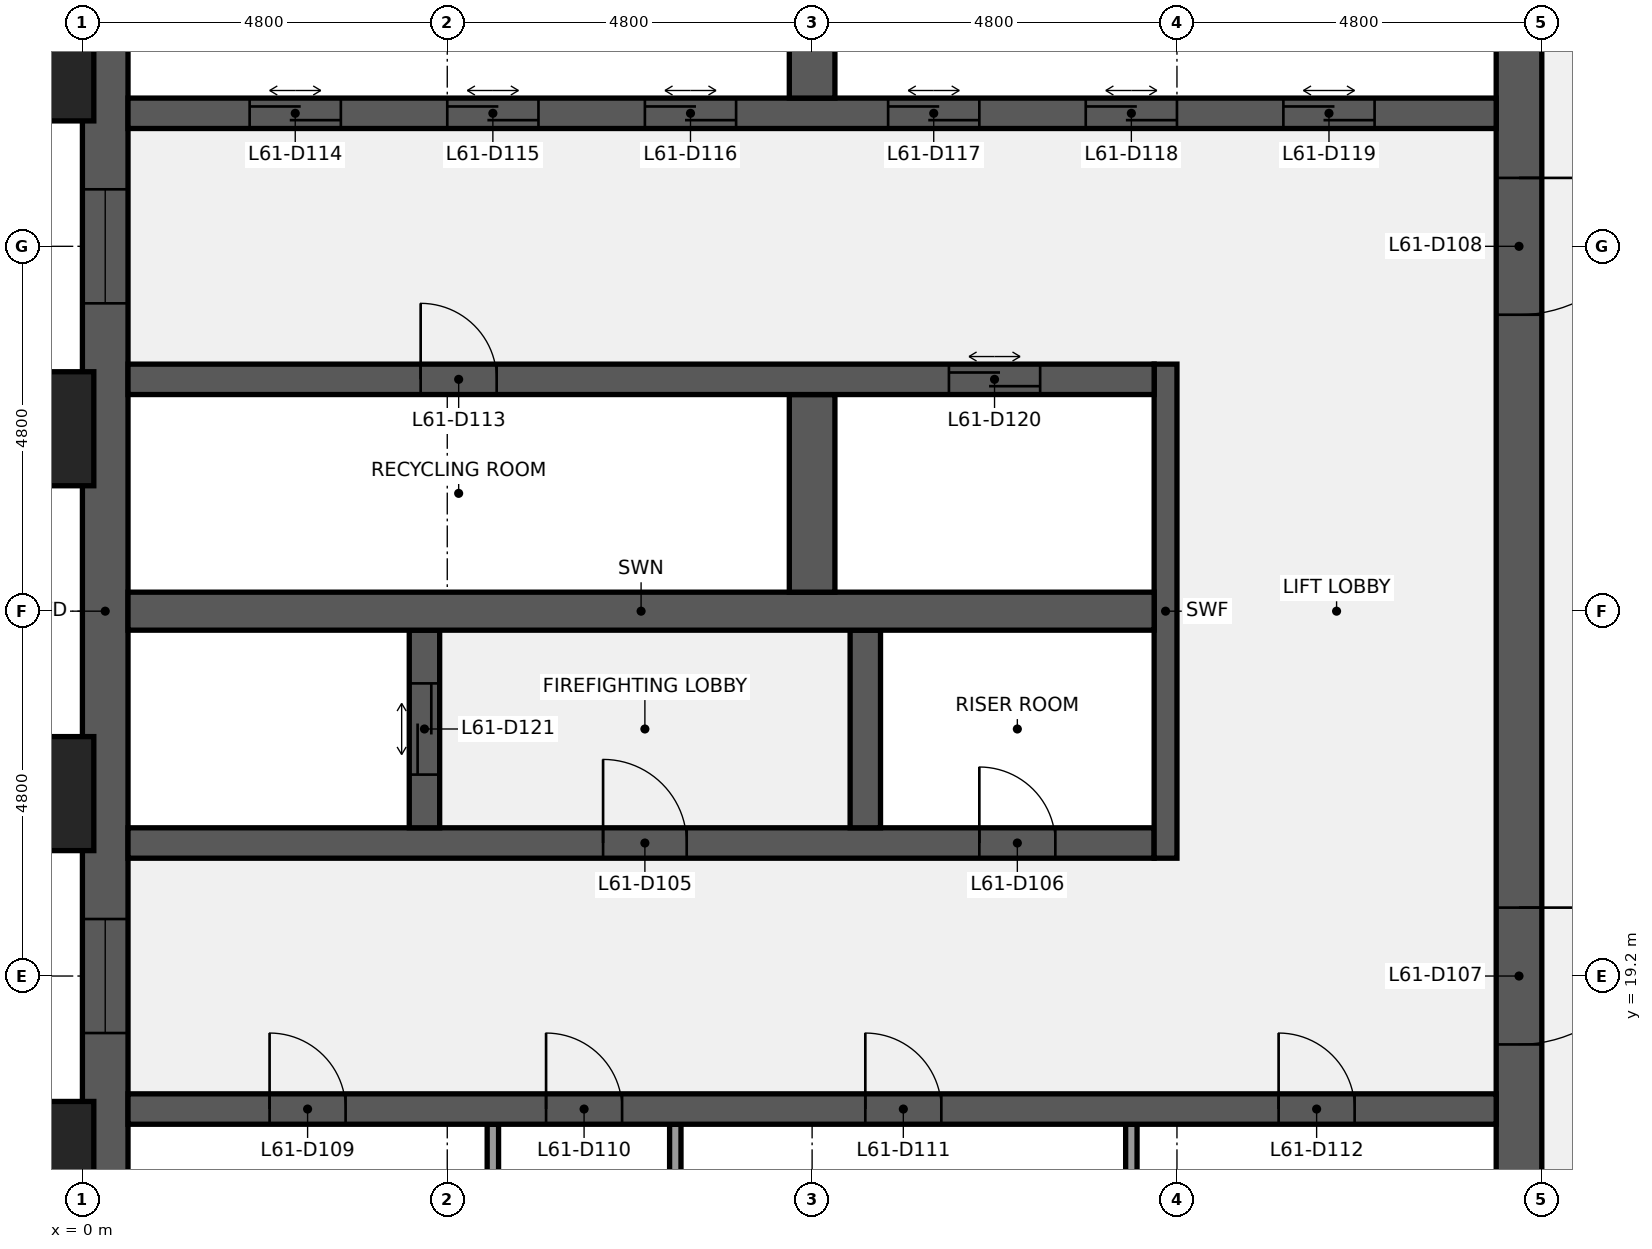
"""IFC4 building model, lengths in metres.
Left out: names, types, materials, properties, quantities, classifications, styles, units other than length and angle.
Written with IfcOpenShell. Run it as: python <this file> out.ifc"""

import sys

from ifc_helpers import new_model, si_unit, direction, frame, frame_2d, origin, origin_2d, place, context, subcontext, project, spatial, rectangle, extrude, element, fill, save


model = new_model("IFC4")
c1 = context("Model", 3, precision=1e-05, world=origin(), true_north=direction((0.0, 1.0)))
c2 = subcontext(c1, "Body", "Model", "MODEL_VIEW")
j1 = project(units=[si_unit("LENGTHUNIT", "METRE"), si_unit("PLANEANGLEUNIT", "RADIAN")], contexts=[c1])
p1 = place(None, origin())
s1 = spatial("IfcSite", under=j1, at=p1, CompositionType="ELEMENT")
p2 = place(p1, origin())
s2 = spatial("IfcBuilding", under=s1, at=p2, CompositionType="ELEMENT")
p3 = place(p2, frame((0.0, 0.0, 282.3)))
s3 = spatial("IfcBuildingStorey", under=s2, at=p3, CompositionType="ELEMENT", Elevation=282.3)
p4 = place(p3, frame((0.3, 9.6, 0.0), z_axis=(0.0, 0.0, 1.0), x_axis=(0.0, 1.0, 0.0)))
e1 = element("IfcWall", 1, at=p4, inside=s3, PredefinedType="SHEAR", context=c2, shape_type="SweptSolid", body=[
    extrude(rectangle(XDim=28.8, YDim=0.6, at=frame_2d((14.4, 0.0))), origin(), (0.0, 0.0, 1.0), 3.84),
])
p5 = place(p4, frame((8.85, 0.0, 0.9)))
e2 = element("IfcOpeningElement", 2, at=p5, cuts=e1, PredefinedType="OPENING", context=c2, shape_type="SweptSolid", body=[
    extrude(rectangle(XDim=1.5, YDim=1.5, at=frame_2d((0.75, 0.75))), frame((0.0, 0.31, 0.0), z_axis=(0.0, -1.0, 0.0), x_axis=(1.0, 0.0, 0.0)), (0.0, 0.0, 1.0), 0.62),
])
p6 = place(p4, frame((18.45, 0.0, 0.9)))
e3 = element("IfcOpeningElement", 3, at=p6, cuts=e1, PredefinedType="OPENING", context=c2, shape_type="SweptSolid", body=[
    extrude(rectangle(XDim=1.5, YDim=1.5, at=frame_2d((0.75, 0.75))), frame((0.0, 0.31, 0.0), z_axis=(0.0, -1.0, 0.0), x_axis=(1.0, 0.0, 0.0)), (0.0, 0.0, 1.0), 0.62),
])
p7 = place(p3, frame((18.9, 38.4, 0.0), z_axis=(0.0, 0.0, 1.0), x_axis=(0.0, -1.0, 0.0)))
e4 = element("IfcWall", 4, at=p7, inside=s3, PredefinedType="SHEAR", context=c2, shape_type="SweptSolid", body=[
    extrude(rectangle(XDim=28.8, YDim=0.6, at=frame_2d((14.4, 0.0))), origin(), (0.0, 0.0, 1.0), 3.84),
])
p8 = place(p7, frame((18.3, 0.0, 0.0)))
e5 = element("IfcOpeningElement", 5, at=p8, cuts=e4, PredefinedType="OPENING", context=c2, shape_type="SweptSolid", body=[
    extrude(rectangle(XDim=1.8, YDim=2.1, at=frame_2d((0.9, 1.05))), frame((0.0, 0.31, 0.0), z_axis=(0.0, -1.0, 0.0), x_axis=(1.0, 0.0, 0.0)), (0.0, 0.0, 1.0), 0.62),
])
p9 = place(p7, frame((8.7, 0.0, 0.0)))
e6 = element("IfcOpeningElement", 6, at=p9, cuts=e4, PredefinedType="OPENING", context=c2, shape_type="SweptSolid", body=[
    extrude(rectangle(XDim=1.8, YDim=2.1, at=frame_2d((0.9, 1.05))), frame((0.0, 0.31, 0.0), z_axis=(0.0, -1.0, 0.0), x_axis=(1.0, 0.0, 0.0)), (0.0, 0.0, 1.0), 0.62),
])
for number, where, z_axis, x_axis in (
    (7, (5.4, 14.65, 0.0), (0.0, 0.0, 1.0), (0.0, 1.0, 0.0)),
    (8, (7.8, 14.65, 0.0), (0.0, 0.0, 1.0), (0.0, 1.0, 0.0)),
    (9, (13.8, 14.65, 0.0), (0.0, 0.0, 1.0), (0.0, 1.0, 0.0)),
):
    element("IfcWall", number, at=place(p3, frame(where, z_axis=z_axis, x_axis=x_axis)), inside=s3, PredefinedType="PARTITIONING", context=c2, shape_type="SweptSolid", body=[
        extrude(rectangle(XDim=2.6, YDim=0.15, at=frame_2d((1.3, 0.0))), origin(), (0.0, 0.0, 1.0), 3.84),
    ])
p10 = place(p3, frame((0.6, 17.45, 0.0), z_axis=(0.0, 0.0, 1.0), x_axis=(1.0, 0.0, 0.0)))
e10 = element("IfcWall", 10, at=p10, inside=s3, PredefinedType="SHEAR", context=c2, shape_type="SweptSolid", body=[
    extrude(rectangle(XDim=18.0, YDim=0.4, at=frame_2d((9.0, 0.0))), origin(), (0.0, 0.0, 1.0), 3.84),
])
p11 = place(p10, frame((1.863, 0.0, 0.0)))
e11 = element("IfcOpeningElement", 11, at=p11, cuts=e10, PredefinedType="OPENING", context=c2, shape_type="SweptSolid", body=[
    extrude(rectangle(XDim=1.0, YDim=2.1, at=frame_2d((0.5, 1.05))), frame((0.0, 0.21, 0.0), z_axis=(0.0, -1.0, 0.0), x_axis=(1.0, 0.0, 0.0)), (0.0, 0.0, 1.0), 0.42),
])
p12 = place(p10, frame((5.5, 0.0, 0.0)))
e12 = element("IfcOpeningElement", 12, at=p12, cuts=e10, PredefinedType="OPENING", context=c2, shape_type="SweptSolid", body=[
    extrude(rectangle(XDim=1.0, YDim=2.1, at=frame_2d((0.5, 1.05))), frame((0.0, 0.21, 0.0), z_axis=(0.0, -1.0, 0.0), x_axis=(1.0, 0.0, 0.0)), (0.0, 0.0, 1.0), 0.42),
])
p13 = place(p10, frame((9.7, 0.0, 0.0)))
e13 = element("IfcOpeningElement", 13, at=p13, cuts=e10, PredefinedType="OPENING", context=c2, shape_type="SweptSolid", body=[
    extrude(rectangle(XDim=1.0, YDim=2.1, at=frame_2d((0.5, 1.05))), frame((0.0, 0.21, 0.0), z_axis=(0.0, -1.0, 0.0), x_axis=(1.0, 0.0, 0.0)), (0.0, 0.0, 1.0), 0.42),
])
p14 = place(p10, frame((15.137, 0.0, 0.0)))
e14 = element("IfcOpeningElement", 14, at=p14, cuts=e10, PredefinedType="OPENING", context=c2, shape_type="SweptSolid", body=[
    extrude(rectangle(XDim=1.0, YDim=2.1, at=frame_2d((0.5, 1.05))), frame((0.0, 0.21, 0.0), z_axis=(0.0, -1.0, 0.0), x_axis=(1.0, 0.0, 0.0)), (0.0, 0.0, 1.0), 0.42),
])
p15 = place(p3, frame((0.6, 20.95, 0.0), z_axis=(0.0, 0.0, 1.0), x_axis=(1.0, 0.0, 0.0)))
e15 = element("IfcWall", 15, at=p15, inside=s3, PredefinedType="SHEAR", context=c2, shape_type="SweptSolid", body=[
    extrude(rectangle(XDim=13.5, YDim=0.4, at=frame_2d((6.75, 0.0))), origin(), (0.0, 0.0, 1.0), 3.84),
])
p16 = place(p15, frame((6.25, 0.0, 0.0)))
e16 = element("IfcOpeningElement", 16, at=p16, cuts=e15, PredefinedType="OPENING", context=c2, shape_type="SweptSolid", body=[
    extrude(rectangle(XDim=1.1, YDim=2.1, at=frame_2d((0.55, 1.05))), frame((0.0, 0.21, 0.0), z_axis=(0.0, -1.0, 0.0), x_axis=(1.0, 0.0, 0.0)), (0.0, 0.0, 1.0), 0.42),
])
p17 = place(p15, frame((11.2, 0.0, 0.0)))
e17 = element("IfcOpeningElement", 17, at=p17, cuts=e15, PredefinedType="OPENING", context=c2, shape_type="SweptSolid", body=[
    extrude(rectangle(XDim=1.0, YDim=2.1, at=frame_2d((0.5, 1.05))), frame((0.0, 0.21, 0.0), z_axis=(0.0, -1.0, 0.0), x_axis=(1.0, 0.0, 0.0)), (0.0, 0.0, 1.0), 0.42),
])
p18 = place(p3, frame((14.25, 20.75, 0.0), z_axis=(0.0, 0.0, 1.0), x_axis=(0.0, 1.0, 0.0)))
e18 = element("IfcWall", 18, at=p18, inside=s3, PredefinedType="SHEAR", context=c2, shape_type="SweptSolid", body=[
    extrude(rectangle(XDim=6.5, YDim=0.3, at=frame_2d((3.25, 0.0))), origin(), (0.0, 0.0, 1.0), 3.84),
])
p19 = place(p3, frame((4.5, 21.15, 0.0), z_axis=(0.0, 0.0, 1.0), x_axis=(0.0, 1.0, 0.0)))
e19 = element("IfcWall", 19, at=p19, inside=s3, PredefinedType="SHEAR", context=c2, shape_type="SweptSolid", body=[
    extrude(rectangle(XDim=2.6, YDim=0.4, at=frame_2d((1.3, 0.0))), origin(), (0.0, 0.0, 1.0), 3.84),
])
p20 = place(p19, frame((0.7, 0.0, 0.0)))
e20 = element("IfcOpeningElement", 20, at=p20, cuts=e19, PredefinedType="OPENING", context=c2, shape_type="SweptSolid", body=[
    extrude(rectangle(XDim=1.2, YDim=2.1, at=frame_2d((0.6, 1.05))), frame((0.0, 0.21, 0.0), z_axis=(0.0, -1.0, 0.0), x_axis=(1.0, 0.0, 0.0)), (0.0, 0.0, 1.0), 0.42),
])
p21 = place(p3, frame((10.3, 21.15, 0.0), z_axis=(0.0, 0.0, 1.0), x_axis=(0.0, 1.0, 0.0)))
e21 = element("IfcWall", 21, at=p21, inside=s3, PredefinedType="SHEAR", context=c2, shape_type="SweptSolid", body=[
    extrude(rectangle(XDim=2.6, YDim=0.4, at=frame_2d((1.3, 0.0))), origin(), (0.0, 0.0, 1.0), 3.84),
])
p22 = place(p3, frame((0.6, 24.0, 0.0), z_axis=(0.0, 0.0, 1.0), x_axis=(1.0, 0.0, 0.0)))
e22 = element("IfcWall", 22, at=p22, inside=s3, PredefinedType="SHEAR", context=c2, shape_type="SweptSolid", body=[
    extrude(rectangle(XDim=13.5, YDim=0.5, at=frame_2d((6.75, 0.0))), origin(), (0.0, 0.0, 1.0), 3.84),
])
p23 = place(p3, frame((9.6, 24.25, 0.0), z_axis=(0.0, 0.0, 1.0), x_axis=(0.0, 1.0, 0.0)))
e23 = element("IfcWall", 23, at=p23, inside=s3, PredefinedType="SHEAR", context=c2, shape_type="SweptSolid", body=[
    extrude(rectangle(XDim=2.6, YDim=0.6, at=frame_2d((1.3, 0.0))), origin(), (0.0, 0.0, 1.0), 3.84),
])
p24 = place(p3, frame((0.6, 27.05, 0.0), z_axis=(0.0, 0.0, 1.0), x_axis=(1.0, 0.0, 0.0)))
e24 = element("IfcWall", 24, at=p24, inside=s3, PredefinedType="SHEAR", context=c2, shape_type="SweptSolid", body=[
    extrude(rectangle(XDim=13.5, YDim=0.4, at=frame_2d((6.75, 0.0))), origin(), (0.0, 0.0, 1.0), 3.84),
])
p25 = place(p24, frame((3.85, 0.0, 0.0)))
e25 = element("IfcOpeningElement", 25, at=p25, cuts=e24, PredefinedType="OPENING", context=c2, shape_type="SweptSolid", body=[
    extrude(rectangle(XDim=1.0, YDim=2.1, at=frame_2d((0.5, 1.05))), frame((0.0, 0.21, 0.0), z_axis=(0.0, -1.0, 0.0), x_axis=(1.0, 0.0, 0.0)), (0.0, 0.0, 1.0), 0.42),
])
p26 = place(p24, frame((10.8, 0.0, 0.0)))
e26 = element("IfcOpeningElement", 26, at=p26, cuts=e24, PredefinedType="OPENING", context=c2, shape_type="SweptSolid", body=[
    extrude(rectangle(XDim=1.2, YDim=2.1, at=frame_2d((0.6, 1.05))), frame((0.0, 0.21, 0.0), z_axis=(0.0, -1.0, 0.0), x_axis=(1.0, 0.0, 0.0)), (0.0, 0.0, 1.0), 0.42),
])
p27 = place(p3, frame((0.6, 30.55, 0.0), z_axis=(0.0, 0.0, 1.0), x_axis=(1.0, 0.0, 0.0)))
e27 = element("IfcWall", 27, at=p27, inside=s3, PredefinedType="SHEAR", context=c2, shape_type="SweptSolid", body=[
    extrude(rectangle(XDim=18.0, YDim=0.4, at=frame_2d((9.0, 0.0))), origin(), (0.0, 0.0, 1.0), 3.84),
])
p28 = place(p27, frame((1.6, 0.0, 0.0)))
e28 = element("IfcOpeningElement", 28, at=p28, cuts=e27, PredefinedType="OPENING", context=c2, shape_type="SweptSolid", body=[
    extrude(rectangle(XDim=1.2, YDim=2.1, at=frame_2d((0.6, 1.05))), frame((0.0, 0.21, 0.0), z_axis=(0.0, -1.0, 0.0), x_axis=(1.0, 0.0, 0.0)), (0.0, 0.0, 1.0), 0.42),
])
p29 = place(p27, frame((4.2, 0.0, 0.0)))
e29 = element("IfcOpeningElement", 29, at=p29, cuts=e27, PredefinedType="OPENING", context=c2, shape_type="SweptSolid", body=[
    extrude(rectangle(XDim=1.2, YDim=2.1, at=frame_2d((0.6, 1.05))), frame((0.0, 0.21, 0.0), z_axis=(0.0, -1.0, 0.0), x_axis=(1.0, 0.0, 0.0)), (0.0, 0.0, 1.0), 0.42),
])
p30 = place(p27, frame((6.8, 0.0, 0.0)))
e30 = element("IfcOpeningElement", 30, at=p30, cuts=e27, PredefinedType="OPENING", context=c2, shape_type="SweptSolid", body=[
    extrude(rectangle(XDim=1.2, YDim=2.1, at=frame_2d((0.6, 1.05))), frame((0.0, 0.21, 0.0), z_axis=(0.0, -1.0, 0.0), x_axis=(1.0, 0.0, 0.0)), (0.0, 0.0, 1.0), 0.42),
])
p31 = place(p27, frame((10.0, 0.0, 0.0)))
e31 = element("IfcOpeningElement", 31, at=p31, cuts=e27, PredefinedType="OPENING", context=c2, shape_type="SweptSolid", body=[
    extrude(rectangle(XDim=1.2, YDim=2.1, at=frame_2d((0.6, 1.05))), frame((0.0, 0.21, 0.0), z_axis=(0.0, -1.0, 0.0), x_axis=(1.0, 0.0, 0.0)), (0.0, 0.0, 1.0), 0.42),
])
p32 = place(p27, frame((12.6, 0.0, 0.0)))
e32 = element("IfcOpeningElement", 32, at=p32, cuts=e27, PredefinedType="OPENING", context=c2, shape_type="SweptSolid", body=[
    extrude(rectangle(XDim=1.2, YDim=2.1, at=frame_2d((0.6, 1.05))), frame((0.0, 0.21, 0.0), z_axis=(0.0, -1.0, 0.0), x_axis=(1.0, 0.0, 0.0)), (0.0, 0.0, 1.0), 0.42),
])
p33 = place(p27, frame((15.2, 0.0, 0.0)))
e33 = element("IfcOpeningElement", 33, at=p33, cuts=e27, PredefinedType="OPENING", context=c2, shape_type="SweptSolid", body=[
    extrude(rectangle(XDim=1.2, YDim=2.1, at=frame_2d((0.6, 1.05))), frame((0.0, 0.21, 0.0), z_axis=(0.0, -1.0, 0.0), x_axis=(1.0, 0.0, 0.0)), (0.0, 0.0, 1.0), 0.42),
])
p34 = place(p3, frame((9.6, 30.75, 0.0), z_axis=(0.0, 0.0, 1.0), x_axis=(0.0, 1.0, 0.0)))
e34 = element("IfcWall", 34, at=p34, inside=s3, PredefinedType="SHEAR", context=c2, shape_type="SweptSolid", body=[
    extrude(rectangle(XDim=2.6, YDim=0.6, at=frame_2d((1.3, 0.0))), origin(), (0.0, 0.0, 1.0), 3.84),
])
for number, where, z_axis, x_axis in (
    (35, (-0.75, 16.8, 0.0), (0.0, 0.0, 1.0), (0.0, 1.0, 0.0)),
    (36, (-0.75, 21.6, 0.0), (0.0, 0.0, 1.0), (0.0, 1.0, 0.0)),
    (37, (-0.75, 26.4, 0.0), (0.0, 0.0, 1.0), (0.0, 1.0, 0.0)),
    (38, (-0.75, 31.2, 0.0), (0.0, 0.0, 1.0), (0.0, 1.0, 0.0)),
):
    element("IfcColumn", number, at=place(p3, frame(where, z_axis=z_axis, x_axis=x_axis)), inside=s3, PredefinedType="PILASTER", context=c2, shape_type="SweptSolid", body=[
        extrude(rectangle(XDim=1.8, YDim=1.5, at=origin_2d()), origin(), (0.0, 0.0, 1.0), 4.0),
    ])
p35 = place(p16, origin())
e39 = element("IfcDoor", 39, at=p35, inside=s3, OperationType="SINGLE_SWING_LEFT", PredefinedType="DOOR", context=c2, shape_type="SweptSolid", body=[
    extrude(rectangle(XDim=1.1, YDim=2.1, at=frame_2d((0.55, 1.05))), frame((0.0, 0.025, 0.0), z_axis=(0.0, -1.0, 0.0), x_axis=(1.0, 0.0, 0.0)), (0.0, 0.0, 1.0), 0.05),
])
fill(e16, e39)
p36 = place(p17, origin())
e40 = element("IfcDoor", 40, at=p36, inside=s3, OperationType="SINGLE_SWING_LEFT", PredefinedType="DOOR", context=c2, shape_type="SweptSolid", body=[
    extrude(rectangle(XDim=1.0, YDim=2.1, at=frame_2d((0.5, 1.05))), frame((0.0, 0.025, 0.0), z_axis=(0.0, -1.0, 0.0), x_axis=(1.0, 0.0, 0.0)), (0.0, 0.0, 1.0), 0.05),
])
fill(e17, e40)
p37 = place(p8, origin())
e41 = element("IfcDoor", 41, at=p37, inside=s3, OperationType="DOUBLE_DOOR_SINGLE_SWING", PredefinedType="DOOR", context=c2, shape_type="SweptSolid", body=[
    extrude(rectangle(XDim=1.8, YDim=2.1, at=frame_2d((0.9, 1.05))), frame((0.0, 0.025, 0.0), z_axis=(0.0, -1.0, 0.0), x_axis=(1.0, 0.0, 0.0)), (0.0, 0.0, 1.0), 0.05),
])
fill(e5, e41)
p38 = place(p9, origin())
e42 = element("IfcDoor", 42, at=p38, inside=s3, OperationType="DOUBLE_DOOR_SINGLE_SWING", PredefinedType="DOOR", context=c2, shape_type="SweptSolid", body=[
    extrude(rectangle(XDim=1.8, YDim=2.1, at=frame_2d((0.9, 1.05))), frame((0.0, 0.025, 0.0), z_axis=(0.0, -1.0, 0.0), x_axis=(1.0, 0.0, 0.0)), (0.0, 0.0, 1.0), 0.05),
])
fill(e6, e42)
p39 = place(p11, origin())
e43 = element("IfcDoor", 43, at=p39, inside=s3, OperationType="SINGLE_SWING_LEFT", PredefinedType="DOOR", context=c2, shape_type="SweptSolid", body=[
    extrude(rectangle(XDim=1.0, YDim=2.1, at=frame_2d((0.5, 1.05))), frame((0.0, 0.025, 0.0), z_axis=(0.0, -1.0, 0.0), x_axis=(1.0, 0.0, 0.0)), (0.0, 0.0, 1.0), 0.05),
])
fill(e11, e43)
p40 = place(p12, origin())
e44 = element("IfcDoor", 44, at=p40, inside=s3, OperationType="SINGLE_SWING_LEFT", PredefinedType="DOOR", context=c2, shape_type="SweptSolid", body=[
    extrude(rectangle(XDim=1.0, YDim=2.1, at=frame_2d((0.5, 1.05))), frame((0.0, 0.025, 0.0), z_axis=(0.0, -1.0, 0.0), x_axis=(1.0, 0.0, 0.0)), (0.0, 0.0, 1.0), 0.05),
])
fill(e12, e44)
p41 = place(p13, origin())
e45 = element("IfcDoor", 45, at=p41, inside=s3, OperationType="SINGLE_SWING_LEFT", PredefinedType="DOOR", context=c2, shape_type="SweptSolid", body=[
    extrude(rectangle(XDim=1.0, YDim=2.1, at=frame_2d((0.5, 1.05))), frame((0.0, 0.025, 0.0), z_axis=(0.0, -1.0, 0.0), x_axis=(1.0, 0.0, 0.0)), (0.0, 0.0, 1.0), 0.05),
])
fill(e13, e45)
p42 = place(p14, origin())
e46 = element("IfcDoor", 46, at=p42, inside=s3, OperationType="SINGLE_SWING_LEFT", PredefinedType="DOOR", context=c2, shape_type="SweptSolid", body=[
    extrude(rectangle(XDim=1.0, YDim=2.1, at=frame_2d((0.5, 1.05))), frame((0.0, 0.025, 0.0), z_axis=(0.0, -1.0, 0.0), x_axis=(1.0, 0.0, 0.0)), (0.0, 0.0, 1.0), 0.05),
])
fill(e14, e46)
p43 = place(p25, origin())
e47 = element("IfcDoor", 47, at=p43, inside=s3, OperationType="SINGLE_SWING_LEFT", PredefinedType="DOOR", context=c2, shape_type="SweptSolid", body=[
    extrude(rectangle(XDim=1.0, YDim=2.1, at=frame_2d((0.5, 1.05))), frame((0.0, 0.025, 0.0), z_axis=(0.0, -1.0, 0.0), x_axis=(1.0, 0.0, 0.0)), (0.0, 0.0, 1.0), 0.05),
])
fill(e25, e47)
p44 = place(p28, origin())
e48 = element("IfcDoor", 48, at=p44, inside=s3, OperationType="DOUBLE_DOOR_SLIDING", PredefinedType="DOOR", context=c2, shape_type="SweptSolid", body=[
    extrude(rectangle(XDim=1.2, YDim=2.1, at=frame_2d((0.6, 1.05))), frame((0.0, 0.025, 0.0), z_axis=(0.0, -1.0, 0.0), x_axis=(1.0, 0.0, 0.0)), (0.0, 0.0, 1.0), 0.05),
])
fill(e28, e48)
p45 = place(p29, origin())
e49 = element("IfcDoor", 49, at=p45, inside=s3, OperationType="DOUBLE_DOOR_SLIDING", PredefinedType="DOOR", context=c2, shape_type="SweptSolid", body=[
    extrude(rectangle(XDim=1.2, YDim=2.1, at=frame_2d((0.6, 1.05))), frame((0.0, 0.025, 0.0), z_axis=(0.0, -1.0, 0.0), x_axis=(1.0, 0.0, 0.0)), (0.0, 0.0, 1.0), 0.05),
])
fill(e29, e49)
p46 = place(p30, origin())
e50 = element("IfcDoor", 50, at=p46, inside=s3, OperationType="DOUBLE_DOOR_SLIDING", PredefinedType="DOOR", context=c2, shape_type="SweptSolid", body=[
    extrude(rectangle(XDim=1.2, YDim=2.1, at=frame_2d((0.6, 1.05))), frame((0.0, 0.025, 0.0), z_axis=(0.0, -1.0, 0.0), x_axis=(1.0, 0.0, 0.0)), (0.0, 0.0, 1.0), 0.05),
])
fill(e30, e50)
p47 = place(p31, origin())
e51 = element("IfcDoor", 51, at=p47, inside=s3, OperationType="DOUBLE_DOOR_SLIDING", PredefinedType="DOOR", context=c2, shape_type="SweptSolid", body=[
    extrude(rectangle(XDim=1.2, YDim=2.1, at=frame_2d((0.6, 1.05))), frame((0.0, 0.025, 0.0), z_axis=(0.0, -1.0, 0.0), x_axis=(1.0, 0.0, 0.0)), (0.0, 0.0, 1.0), 0.05),
])
fill(e31, e51)
p48 = place(p32, origin())
e52 = element("IfcDoor", 52, at=p48, inside=s3, OperationType="DOUBLE_DOOR_SLIDING", PredefinedType="DOOR", context=c2, shape_type="SweptSolid", body=[
    extrude(rectangle(XDim=1.2, YDim=2.1, at=frame_2d((0.6, 1.05))), frame((0.0, 0.025, 0.0), z_axis=(0.0, -1.0, 0.0), x_axis=(1.0, 0.0, 0.0)), (0.0, 0.0, 1.0), 0.05),
])
fill(e32, e52)
p49 = place(p33, origin())
e53 = element("IfcDoor", 53, at=p49, inside=s3, OperationType="DOUBLE_DOOR_SLIDING", PredefinedType="DOOR", context=c2, shape_type="SweptSolid", body=[
    extrude(rectangle(XDim=1.2, YDim=2.1, at=frame_2d((0.6, 1.05))), frame((0.0, 0.025, 0.0), z_axis=(0.0, -1.0, 0.0), x_axis=(1.0, 0.0, 0.0)), (0.0, 0.0, 1.0), 0.05),
])
fill(e33, e53)
p50 = place(p26, origin())
e54 = element("IfcDoor", 54, at=p50, inside=s3, OperationType="DOUBLE_DOOR_SLIDING", PredefinedType="DOOR", context=c2, shape_type="SweptSolid", body=[
    extrude(rectangle(XDim=1.2, YDim=2.1, at=frame_2d((0.6, 1.05))), frame((0.0, 0.025, 0.0), z_axis=(0.0, -1.0, 0.0), x_axis=(1.0, 0.0, 0.0)), (0.0, 0.0, 1.0), 0.05),
])
fill(e26, e54)
p51 = place(p20, origin())
e55 = element("IfcDoor", 55, at=p51, inside=s3, OperationType="DOUBLE_DOOR_SLIDING", PredefinedType="DOOR", context=c2, shape_type="SweptSolid", body=[
    extrude(rectangle(XDim=1.2, YDim=2.1, at=frame_2d((0.6, 1.05))), frame((0.0, 0.025, 0.0), z_axis=(0.0, -1.0, 0.0), x_axis=(1.0, 0.0, 0.0)), (0.0, 0.0, 1.0), 0.05),
])
fill(e20, e55)
p52 = place(p5, origin())
e56 = element("IfcWindow", 56, at=p52, inside=s3, PartitioningType="SINGLE_PANEL", PredefinedType="WINDOW", context=c2, shape_type="SweptSolid", body=[
    extrude(rectangle(XDim=1.5, YDim=1.5, at=frame_2d((0.75, 0.75))), frame((0.0, 0.03, 0.0), z_axis=(0.0, -1.0, 0.0), x_axis=(1.0, 0.0, 0.0)), (0.0, 0.0, 1.0), 0.06),
])
fill(e2, e56)
p53 = place(p6, origin())
e57 = element("IfcWindow", 57, at=p53, inside=s3, PartitioningType="SINGLE_PANEL", PredefinedType="WINDOW", context=c2, shape_type="SweptSolid", body=[
    extrude(rectangle(XDim=1.5, YDim=1.5, at=frame_2d((0.75, 0.75))), frame((0.0, 0.03, 0.0), z_axis=(0.0, -1.0, 0.0), x_axis=(1.0, 0.0, 0.0)), (0.0, 0.0, 1.0), 0.06),
])
fill(e3, e57)
save(model, sys.argv[1])
